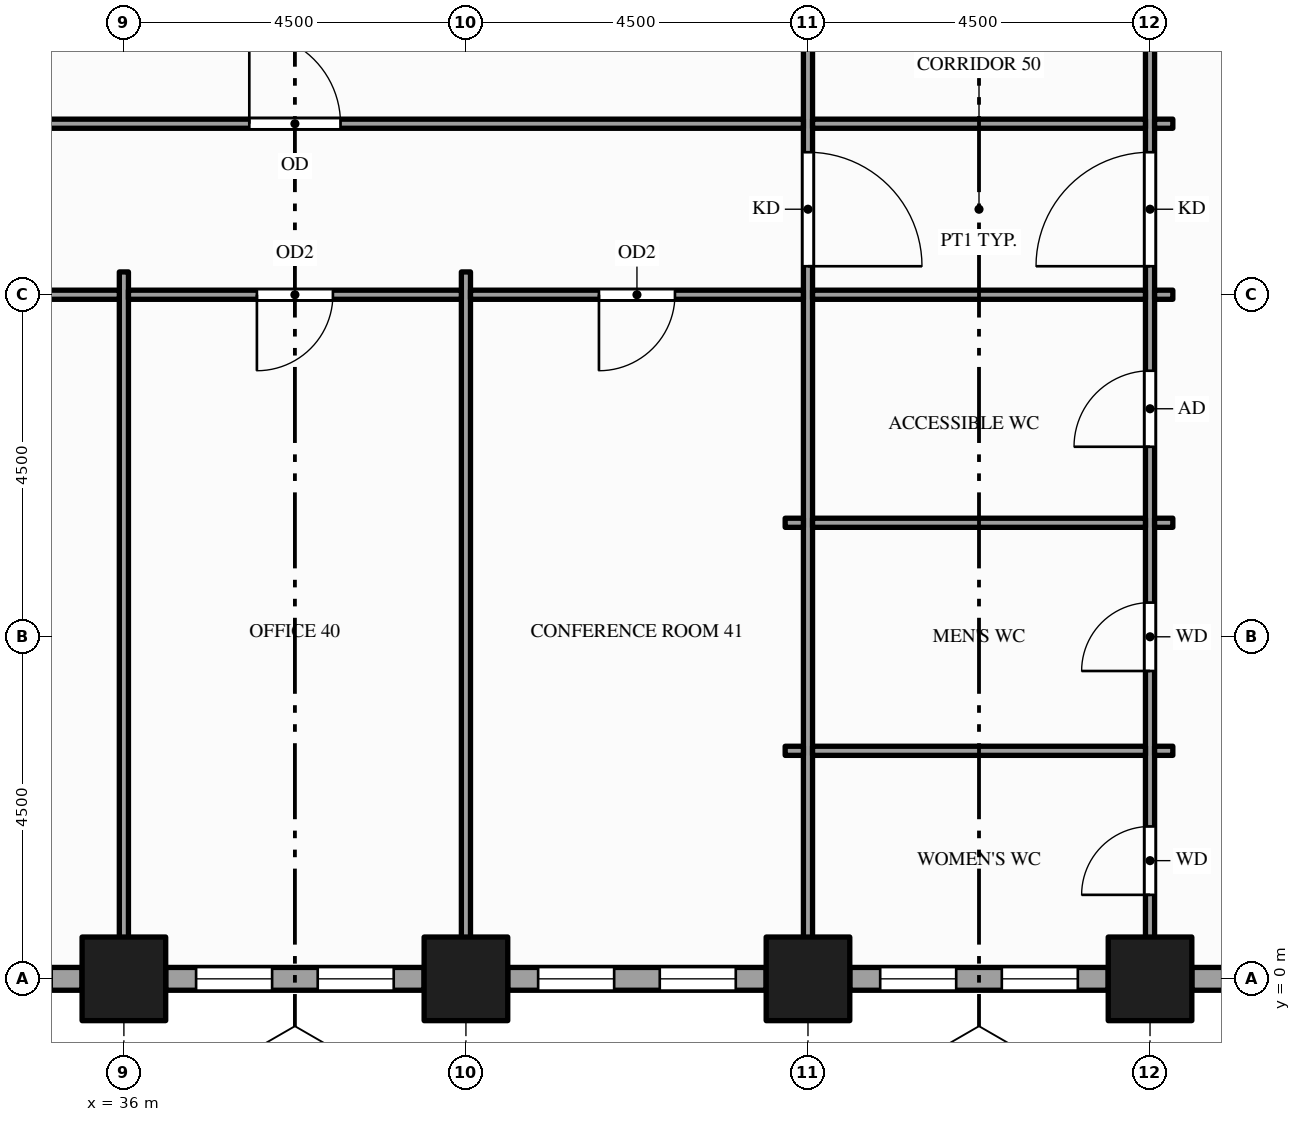
"""IFC4 building model, lengths in metres.
Left out: names, types, materials, properties, quantities, classifications, styles, units other than length and angle.
Written with IfcOpenShell. Run it as: python <this file> out.ifc"""

import sys

from ifc_helpers import new_model, si_unit, direction, frame, frame_2d, origin, origin_2d, place, context, subcontext, project, spatial, rectangle, hollow_rectangle, extrude, element, fill, save


model = new_model("IFC4")
c1 = context("Model", 3, precision=1e-05, world=origin(), true_north=direction((0.0, 1.0)))
c2 = subcontext(c1, "Body", "Model", "MODEL_VIEW")
j1 = project(units=[si_unit("LENGTHUNIT", "METRE"), si_unit("PLANEANGLEUNIT", "RADIAN")], contexts=[c1])
p1 = place(None, origin())
s1 = spatial("IfcSite", under=j1, at=p1, CompositionType="ELEMENT")
p2 = place(p1, origin())
s2 = spatial("IfcBuilding", under=s1, at=p2, CompositionType="ELEMENT")
p3 = place(p2, frame((0.0, 0.0, 8.0)))
s3 = spatial("IfcBuildingStorey", under=s2, at=p3, CompositionType="ELEMENT", Elevation=8.0)
for number, where, z_axis, x_axis in (
    (1, (36.0, 0.0, -0.25), (0.0, 0.0, 1.0), (1.0, 0.0, 0.0)),
    (2, (40.5, 0.0, -0.25), (0.0, 0.0, 1.0), (1.0, 0.0, 0.0)),
    (3, (45.0, 0.0, -0.25), (0.0, 0.0, 1.0), (1.0, 0.0, 0.0)),
    (4, (49.5, 0.0, -0.25), (0.0, 0.0, 1.0), (1.0, 0.0, 0.0)),
):
    element("IfcColumn", number, at=place(p3, frame(where, z_axis=z_axis, x_axis=x_axis)), inside=s3, PredefinedType="COLUMN", context=c2, shape_type="SweptSolid", body=[
        extrude(hollow_rectangle(XDim=1.1, YDim=1.1, WallThickness=0.06, at=origin_2d()), origin(), (0.0, 0.0, 1.0), 6.0),
    ])
p4 = place(p3, frame((32.05, 0.0, 0.0), z_axis=(0.0, 0.0, 1.0), x_axis=(1.0, 0.0, 0.0)))
e5 = element("IfcWall", 5, at=p4, inside=s3, PredefinedType="STANDARD", context=c2, shape_type="SweptSolid", body=[
    extrude(rectangle(XDim=3.4, YDim=0.3, at=frame_2d((1.7, 0.0))), origin(), (0.0, 0.0, 1.0), 5.036),
])
p5 = place(p4, frame((0.4, 0.0, 0.9)))
e6 = element("IfcOpeningElement", 6, at=p5, cuts=e5, PredefinedType="OPENING", context=c2, shape_type="SweptSolid", body=[
    extrude(rectangle(XDim=1.0, YDim=3.5, at=frame_2d((0.5, 1.75))), frame((0.0, 0.16, 0.0), z_axis=(0.0, -1.0, 0.0), x_axis=(1.0, 0.0, 0.0)), (0.0, 0.0, 1.0), 0.32),
])
p6 = place(p4, frame((2.0, 0.0, 0.9)))
e7 = element("IfcOpeningElement", 7, at=p6, cuts=e5, PredefinedType="OPENING", context=c2, shape_type="SweptSolid", body=[
    extrude(rectangle(XDim=1.0, YDim=3.5, at=frame_2d((0.5, 1.75))), frame((0.0, 0.16, 0.0), z_axis=(0.0, -1.0, 0.0), x_axis=(1.0, 0.0, 0.0)), (0.0, 0.0, 1.0), 0.32),
])
p7 = place(p3, frame((36.55, 0.0, 0.0), z_axis=(0.0, 0.0, 1.0), x_axis=(1.0, 0.0, 0.0)))
e8 = element("IfcWall", 8, at=p7, inside=s3, PredefinedType="STANDARD", context=c2, shape_type="SweptSolid", body=[
    extrude(rectangle(XDim=3.4, YDim=0.3, at=frame_2d((1.7, 0.0))), origin(), (0.0, 0.0, 1.0), 5.036),
])
p8 = place(p7, frame((0.4, 0.0, 0.9)))
e9 = element("IfcOpeningElement", 9, at=p8, cuts=e8, PredefinedType="OPENING", context=c2, shape_type="SweptSolid", body=[
    extrude(rectangle(XDim=1.0, YDim=3.5, at=frame_2d((0.5, 1.75))), frame((0.0, 0.16, 0.0), z_axis=(0.0, -1.0, 0.0), x_axis=(1.0, 0.0, 0.0)), (0.0, 0.0, 1.0), 0.32),
])
p9 = place(p7, frame((2.0, 0.0, 0.9)))
e10 = element("IfcOpeningElement", 10, at=p9, cuts=e8, PredefinedType="OPENING", context=c2, shape_type="SweptSolid", body=[
    extrude(rectangle(XDim=1.0, YDim=3.5, at=frame_2d((0.5, 1.75))), frame((0.0, 0.16, 0.0), z_axis=(0.0, -1.0, 0.0), x_axis=(1.0, 0.0, 0.0)), (0.0, 0.0, 1.0), 0.32),
])
p10 = place(p3, frame((41.05, 0.0, 0.0), z_axis=(0.0, 0.0, 1.0), x_axis=(1.0, 0.0, 0.0)))
e11 = element("IfcWall", 11, at=p10, inside=s3, PredefinedType="STANDARD", context=c2, shape_type="SweptSolid", body=[
    extrude(rectangle(XDim=3.4, YDim=0.3, at=frame_2d((1.7, 0.0))), origin(), (0.0, 0.0, 1.0), 5.036),
])
p11 = place(p10, frame((0.4, 0.0, 0.9)))
e12 = element("IfcOpeningElement", 12, at=p11, cuts=e11, PredefinedType="OPENING", context=c2, shape_type="SweptSolid", body=[
    extrude(rectangle(XDim=1.0, YDim=3.5, at=frame_2d((0.5, 1.75))), frame((0.0, 0.16, 0.0), z_axis=(0.0, -1.0, 0.0), x_axis=(1.0, 0.0, 0.0)), (0.0, 0.0, 1.0), 0.32),
])
p12 = place(p10, frame((2.0, 0.0, 0.9)))
e13 = element("IfcOpeningElement", 13, at=p12, cuts=e11, PredefinedType="OPENING", context=c2, shape_type="SweptSolid", body=[
    extrude(rectangle(XDim=1.0, YDim=3.5, at=frame_2d((0.5, 1.75))), frame((0.0, 0.16, 0.0), z_axis=(0.0, -1.0, 0.0), x_axis=(1.0, 0.0, 0.0)), (0.0, 0.0, 1.0), 0.32),
])
p13 = place(p3, frame((45.55, 0.0, 0.0), z_axis=(0.0, 0.0, 1.0), x_axis=(1.0, 0.0, 0.0)))
e14 = element("IfcWall", 14, at=p13, inside=s3, PredefinedType="STANDARD", context=c2, shape_type="SweptSolid", body=[
    extrude(rectangle(XDim=3.4, YDim=0.3, at=frame_2d((1.7, 0.0))), origin(), (0.0, 0.0, 1.0), 5.036),
])
p14 = place(p13, frame((0.4, 0.0, 0.9)))
e15 = element("IfcOpeningElement", 15, at=p14, cuts=e14, PredefinedType="OPENING", context=c2, shape_type="SweptSolid", body=[
    extrude(rectangle(XDim=1.0, YDim=3.5, at=frame_2d((0.5, 1.75))), frame((0.0, 0.16, 0.0), z_axis=(0.0, -1.0, 0.0), x_axis=(1.0, 0.0, 0.0)), (0.0, 0.0, 1.0), 0.32),
])
p15 = place(p13, frame((2.0, 0.0, 0.9)))
e16 = element("IfcOpeningElement", 16, at=p15, cuts=e14, PredefinedType="OPENING", context=c2, shape_type="SweptSolid", body=[
    extrude(rectangle(XDim=1.0, YDim=3.5, at=frame_2d((0.5, 1.75))), frame((0.0, 0.16, 0.0), z_axis=(0.0, -1.0, 0.0), x_axis=(1.0, 0.0, 0.0)), (0.0, 0.0, 1.0), 0.32),
])
p16 = place(p3, frame((50.05, 0.0, 0.0), z_axis=(0.0, 0.0, 1.0), x_axis=(1.0, 0.0, 0.0)))
e17 = element("IfcWall", 17, at=p16, inside=s3, PredefinedType="STANDARD", context=c2, shape_type="SweptSolid", body=[
    extrude(rectangle(XDim=3.949, YDim=0.3, at=frame_2d((1.975, 0.0))), origin(), (0.0, 0.0, 1.0), 5.036),
])
p17 = place(p16, frame((0.4, 0.0, 0.9)))
e18 = element("IfcOpeningElement", 18, at=p17, cuts=e17, PredefinedType="OPENING", context=c2, shape_type="SweptSolid", body=[
    extrude(rectangle(XDim=1.0, YDim=3.5, at=frame_2d((0.5, 1.75))), frame((0.0, 0.16, 0.0), z_axis=(0.0, -1.0, 0.0), x_axis=(1.0, 0.0, 0.0)), (0.0, 0.0, 1.0), 0.32),
])
p18 = place(p16, frame((2.024, 0.0, 0.9)))
e19 = element("IfcOpeningElement", 19, at=p18, cuts=e17, PredefinedType="OPENING", context=c2, shape_type="SweptSolid", body=[
    extrude(rectangle(XDim=1.5, YDim=3.5, at=frame_2d((0.75, 1.75))), frame((0.0, 0.16, 0.0), z_axis=(0.0, -1.0, 0.0), x_axis=(1.0, 0.0, 0.0)), (0.0, 0.0, 1.0), 0.32),
])
for number, where, z_axis, x_axis in (
    (20, (36.0, 0.15, 0.0), (0.0, 0.0, 1.0), (0.0, 1.0, 0.0)),
    (21, (40.5, 0.15, 0.0), (0.0, 0.0, 1.0), (0.0, 1.0, 0.0)),
):
    element("IfcWall", number, at=place(p3, frame(where, z_axis=z_axis, x_axis=x_axis)), inside=s3, PredefinedType="PARTITIONING", context=c2, shape_type="SweptSolid", body=[
        extrude(rectangle(XDim=9.15, YDim=0.12, at=frame_2d((4.575, 0.0))), origin(), (0.0, 0.0, 1.0), 4.759),
    ])
p19 = place(p3, frame((45.0, 0.15, 0.0), z_axis=(0.0, 0.0, 1.0), x_axis=(0.0, 1.0, 0.0)))
e22 = element("IfcWall", 22, at=p19, inside=s3, PredefinedType="PARTITIONING", context=c2, shape_type="SweptSolid", body=[
    extrude(rectangle(XDim=22.65, YDim=0.12, at=frame_2d((11.325, 0.0))), origin(), (0.0, 0.0, 1.0), 4.759),
])
p20 = place(p19, frame((9.225, 0.0, 0.0)))
e23 = element("IfcOpeningElement", 23, at=p20, cuts=e22, PredefinedType="OPENING", context=c2, shape_type="SweptSolid", body=[
    extrude(rectangle(XDim=1.5, YDim=2.1, at=frame_2d((0.75, 1.05))), frame((0.0, 0.07, 0.0), z_axis=(0.0, -1.0, 0.0), x_axis=(1.0, 0.0, 0.0)), (0.0, 0.0, 1.0), 0.14),
])
p21 = place(p3, frame((49.5, 0.15, 0.0), z_axis=(0.0, 0.0, 1.0), x_axis=(0.0, 1.0, 0.0)))
e24 = element("IfcWall", 24, at=p21, inside=s3, PredefinedType="PARTITIONING", context=c2, shape_type="SweptSolid", body=[
    extrude(rectangle(XDim=22.65, YDim=0.12, at=frame_2d((11.325, 0.0))), origin(), (0.0, 0.0, 1.0), 4.759),
])
p22 = place(p21, frame((0.955, 0.0, 0.0)))
e25 = element("IfcOpeningElement", 25, at=p22, cuts=e24, PredefinedType="OPENING", context=c2, shape_type="SweptSolid", body=[
    extrude(rectangle(XDim=0.9, YDim=2.1, at=frame_2d((0.45, 1.05))), frame((0.0, 0.07, 0.0), z_axis=(0.0, -1.0, 0.0), x_axis=(1.0, 0.0, 0.0)), (0.0, 0.0, 1.0), 0.14),
])
p23 = place(p21, frame((3.9, 0.0, 0.0)))
e26 = element("IfcOpeningElement", 26, at=p23, cuts=e24, PredefinedType="OPENING", context=c2, shape_type="SweptSolid", body=[
    extrude(rectangle(XDim=0.9, YDim=2.1, at=frame_2d((0.45, 1.05))), frame((0.0, 0.07, 0.0), z_axis=(0.0, -1.0, 0.0), x_axis=(1.0, 0.0, 0.0)), (0.0, 0.0, 1.0), 0.14),
])
p24 = place(p21, frame((6.85, 0.0, 0.0)))
e27 = element("IfcOpeningElement", 27, at=p24, cuts=e24, PredefinedType="OPENING", context=c2, shape_type="SweptSolid", body=[
    extrude(rectangle(XDim=1.0, YDim=2.1, at=frame_2d((0.5, 1.05))), frame((0.0, 0.07, 0.0), z_axis=(0.0, -1.0, 0.0), x_axis=(1.0, 0.0, 0.0)), (0.0, 0.0, 1.0), 0.14),
])
p25 = place(p21, frame((16.275, 0.0, 0.0)))
e28 = element("IfcOpeningElement", 28, at=p25, cuts=e24, PredefinedType="OPENING", context=c2, shape_type="SweptSolid", body=[
    extrude(rectangle(XDim=0.9, YDim=2.1, at=frame_2d((0.45, 1.05))), frame((0.0, 0.07, 0.0), z_axis=(0.0, -1.0, 0.0), x_axis=(1.0, 0.0, 0.0)), (0.0, 0.0, 1.0), 0.14),
])
p26 = place(p21, frame((9.225, 0.0, 0.0)))
e29 = element("IfcOpeningElement", 29, at=p26, cuts=e24, PredefinedType="OPENING", context=c2, shape_type="SweptSolid", body=[
    extrude(rectangle(XDim=1.5, YDim=2.1, at=frame_2d((0.75, 1.05))), frame((0.0, 0.07, 0.0), z_axis=(0.0, -1.0, 0.0), x_axis=(1.0, 0.0, 0.0)), (0.0, 0.0, 1.0), 0.14),
])
p27 = place(p3, frame((44.7, 3.0, 0.0), z_axis=(0.0, 0.0, 1.0), x_axis=(1.0, 0.0, 0.0)))
e30 = element("IfcWall", 30, at=p27, inside=s3, PredefinedType="PARTITIONING", context=c2, shape_type="SweptSolid", body=[
    extrude(rectangle(XDim=0.24, YDim=0.12, at=frame_2d((0.12, 0.0))), origin(), (0.0, 0.0, 1.0), 4.759),
])
p28 = place(p3, frame((45.06, 3.0, 0.0), z_axis=(0.0, 0.0, 1.0), x_axis=(1.0, 0.0, 0.0)))
e31 = element("IfcWall", 31, at=p28, inside=s3, PredefinedType="PARTITIONING", context=c2, shape_type="SweptSolid", body=[
    extrude(rectangle(XDim=4.38, YDim=0.12, at=frame_2d((2.19, 0.0))), origin(), (0.0, 0.0, 1.0), 4.66),
])
for number, where, z_axis, x_axis in (
    (32, (49.56, 3.0, 0.0), (0.0, 0.0, 1.0), (1.0, 0.0, 0.0)),
    (33, (44.7, 6.0, 0.0), (0.0, 0.0, 1.0), (1.0, 0.0, 0.0)),
):
    element("IfcWall", number, at=place(p3, frame(where, z_axis=z_axis, x_axis=x_axis)), inside=s3, PredefinedType="PARTITIONING", context=c2, shape_type="SweptSolid", body=[
        extrude(rectangle(XDim=0.24, YDim=0.12, at=frame_2d((0.12, 0.0))), origin(), (0.0, 0.0, 1.0), 4.759),
    ])
p29 = place(p3, frame((45.06, 6.0, 0.0), z_axis=(0.0, 0.0, 1.0), x_axis=(1.0, 0.0, 0.0)))
e34 = element("IfcWall", 34, at=p29, inside=s3, PredefinedType="PARTITIONING", context=c2, shape_type="SweptSolid", body=[
    extrude(rectangle(XDim=4.38, YDim=0.12, at=frame_2d((2.19, 0.0))), origin(), (0.0, 0.0, 1.0), 4.66),
])
p30 = place(p3, frame((49.56, 6.0, 0.0), z_axis=(0.0, 0.0, 1.0), x_axis=(1.0, 0.0, 0.0)))
e35 = element("IfcWall", 35, at=p30, inside=s3, PredefinedType="PARTITIONING", context=c2, shape_type="SweptSolid", body=[
    extrude(rectangle(XDim=0.24, YDim=0.12, at=frame_2d((0.12, 0.0))), origin(), (0.0, 0.0, 1.0), 4.759),
])
p31 = place(p3, frame((31.56, 9.0, 0.0), z_axis=(0.0, 0.0, 1.0), x_axis=(1.0, 0.0, 0.0)))
e36 = element("IfcWall", 36, at=p31, inside=s3, PredefinedType="PARTITIONING", context=c2, shape_type="SweptSolid", body=[
    extrude(rectangle(XDim=4.38, YDim=0.12, at=frame_2d((2.19, 0.0))), origin(), (0.0, 0.0, 1.0), 4.66),
])
p32 = place(p31, frame((1.69, 0.0, 0.0)))
e37 = element("IfcOpeningElement", 37, at=p32, cuts=e36, PredefinedType="OPENING", context=c2, shape_type="SweptSolid", body=[
    extrude(rectangle(XDim=1.0, YDim=2.1, at=frame_2d((0.5, 1.05))), frame((0.0, 0.07, 0.0), z_axis=(0.0, -1.0, 0.0), x_axis=(1.0, 0.0, 0.0)), (0.0, 0.0, 1.0), 0.14),
])
p33 = place(p3, frame((36.06, 9.0, 0.0), z_axis=(0.0, 0.0, 1.0), x_axis=(1.0, 0.0, 0.0)))
e38 = element("IfcWall", 38, at=p33, inside=s3, PredefinedType="PARTITIONING", context=c2, shape_type="SweptSolid", body=[
    extrude(rectangle(XDim=4.38, YDim=0.12, at=frame_2d((2.19, 0.0))), origin(), (0.0, 0.0, 1.0), 4.66),
])
p34 = place(p33, frame((1.69, 0.0, 0.0)))
e39 = element("IfcOpeningElement", 39, at=p34, cuts=e38, PredefinedType="OPENING", context=c2, shape_type="SweptSolid", body=[
    extrude(rectangle(XDim=1.0, YDim=2.1, at=frame_2d((0.5, 1.05))), frame((0.0, 0.07, 0.0), z_axis=(0.0, -1.0, 0.0), x_axis=(1.0, 0.0, 0.0)), (0.0, 0.0, 1.0), 0.14),
])
p35 = place(p3, frame((40.56, 9.0, 0.0), z_axis=(0.0, 0.0, 1.0), x_axis=(1.0, 0.0, 0.0)))
e40 = element("IfcWall", 40, at=p35, inside=s3, PredefinedType="PARTITIONING", context=c2, shape_type="SweptSolid", body=[
    extrude(rectangle(XDim=4.38, YDim=0.12, at=frame_2d((2.19, 0.0))), origin(), (0.0, 0.0, 1.0), 4.66),
])
p36 = place(p35, frame((1.69, 0.0, 0.0)))
e41 = element("IfcOpeningElement", 41, at=p36, cuts=e40, PredefinedType="OPENING", context=c2, shape_type="SweptSolid", body=[
    extrude(rectangle(XDim=1.0, YDim=2.1, at=frame_2d((0.5, 1.05))), frame((0.0, 0.07, 0.0), z_axis=(0.0, -1.0, 0.0), x_axis=(1.0, 0.0, 0.0)), (0.0, 0.0, 1.0), 0.14),
])
p37 = place(p3, frame((45.06, 9.0, 0.0), z_axis=(0.0, 0.0, 1.0), x_axis=(1.0, 0.0, 0.0)))
e42 = element("IfcWall", 42, at=p37, inside=s3, PredefinedType="PARTITIONING", context=c2, shape_type="SweptSolid", body=[
    extrude(rectangle(XDim=4.38, YDim=0.12, at=frame_2d((2.19, 0.0))), origin(), (0.0, 0.0, 1.0), 4.66),
])
p38 = place(p3, frame((49.56, 9.0, 0.0), z_axis=(0.0, 0.0, 1.0), x_axis=(1.0, 0.0, 0.0)))
e43 = element("IfcWall", 43, at=p38, inside=s3, PredefinedType="PARTITIONING", context=c2, shape_type="SweptSolid", body=[
    extrude(rectangle(XDim=0.24, YDim=0.12, at=frame_2d((0.12, 0.0))), origin(), (0.0, 0.0, 1.0), 4.759),
])
p39 = place(p3, frame((31.56, 11.25, 0.0), z_axis=(0.0, 0.0, 1.0), x_axis=(1.0, 0.0, 0.0)))
e44 = element("IfcWall", 44, at=p39, inside=s3, PredefinedType="PARTITIONING", context=c2, shape_type="SweptSolid", body=[
    extrude(rectangle(XDim=13.38, YDim=0.12, at=frame_2d((6.69, 0.0))), origin(), (0.0, 0.0, 1.0), 4.66),
])
p40 = place(p39, frame((6.09, 0.0, 0.0)))
e45 = element("IfcOpeningElement", 45, at=p40, cuts=e44, PredefinedType="OPENING", context=c2, shape_type="SweptSolid", body=[
    extrude(rectangle(XDim=1.2, YDim=2.1, at=frame_2d((0.6, 1.05))), frame((0.0, 0.07, 0.0), z_axis=(0.0, -1.0, 0.0), x_axis=(1.0, 0.0, 0.0)), (0.0, 0.0, 1.0), 0.14),
])
p41 = place(p3, frame((45.06, 11.25, 0.0), z_axis=(0.0, 0.0, 1.0), x_axis=(1.0, 0.0, 0.0)))
e46 = element("IfcWall", 46, at=p41, inside=s3, PredefinedType="PARTITIONING", context=c2, shape_type="SweptSolid", body=[
    extrude(rectangle(XDim=4.38, YDim=0.12, at=frame_2d((2.19, 0.0))), origin(), (0.0, 0.0, 1.0), 4.66),
])
p42 = place(p3, frame((49.56, 11.25, 0.0), z_axis=(0.0, 0.0, 1.0), x_axis=(1.0, 0.0, 0.0)))
e47 = element("IfcWall", 47, at=p42, inside=s3, PredefinedType="PARTITIONING", context=c2, shape_type="SweptSolid", body=[
    extrude(rectangle(XDim=0.24, YDim=0.12, at=frame_2d((0.12, 0.0))), origin(), (0.0, 0.0, 1.0), 4.759),
])
p43 = place(p8, origin())
e48 = element("IfcWindow", 48, at=p43, inside=s3, PartitioningType="SINGLE_PANEL", PredefinedType="WINDOW", context=c2, shape_type="SweptSolid", body=[
    extrude(rectangle(XDim=1.0, YDim=3.5, at=frame_2d((0.5, 1.75))), frame((0.0, 0.03, 0.0), z_axis=(0.0, -1.0, 0.0), x_axis=(1.0, 0.0, 0.0)), (0.0, 0.0, 1.0), 0.06),
])
fill(e9, e48)
p44 = place(p9, origin())
e49 = element("IfcWindow", 49, at=p44, inside=s3, PartitioningType="SINGLE_PANEL", PredefinedType="WINDOW", context=c2, shape_type="SweptSolid", body=[
    extrude(rectangle(XDim=1.0, YDim=3.5, at=frame_2d((0.5, 1.75))), frame((0.0, 0.03, 0.0), z_axis=(0.0, -1.0, 0.0), x_axis=(1.0, 0.0, 0.0)), (0.0, 0.0, 1.0), 0.06),
])
fill(e10, e49)
p45 = place(p11, origin())
e50 = element("IfcWindow", 50, at=p45, inside=s3, PartitioningType="SINGLE_PANEL", PredefinedType="WINDOW", context=c2, shape_type="SweptSolid", body=[
    extrude(rectangle(XDim=1.0, YDim=3.5, at=frame_2d((0.5, 1.75))), frame((0.0, 0.03, 0.0), z_axis=(0.0, -1.0, 0.0), x_axis=(1.0, 0.0, 0.0)), (0.0, 0.0, 1.0), 0.06),
])
fill(e12, e50)
p46 = place(p12, origin())
e51 = element("IfcWindow", 51, at=p46, inside=s3, PartitioningType="SINGLE_PANEL", PredefinedType="WINDOW", context=c2, shape_type="SweptSolid", body=[
    extrude(rectangle(XDim=1.0, YDim=3.5, at=frame_2d((0.5, 1.75))), frame((0.0, 0.03, 0.0), z_axis=(0.0, -1.0, 0.0), x_axis=(1.0, 0.0, 0.0)), (0.0, 0.0, 1.0), 0.06),
])
fill(e13, e51)
p47 = place(p14, origin())
e52 = element("IfcWindow", 52, at=p47, inside=s3, PartitioningType="SINGLE_PANEL", PredefinedType="WINDOW", context=c2, shape_type="SweptSolid", body=[
    extrude(rectangle(XDim=1.0, YDim=3.5, at=frame_2d((0.5, 1.75))), frame((0.0, 0.03, 0.0), z_axis=(0.0, -1.0, 0.0), x_axis=(1.0, 0.0, 0.0)), (0.0, 0.0, 1.0), 0.06),
])
fill(e15, e52)
p48 = place(p15, origin())
e53 = element("IfcWindow", 53, at=p48, inside=s3, PartitioningType="SINGLE_PANEL", PredefinedType="WINDOW", context=c2, shape_type="SweptSolid", body=[
    extrude(rectangle(XDim=1.0, YDim=3.5, at=frame_2d((0.5, 1.75))), frame((0.0, 0.03, 0.0), z_axis=(0.0, -1.0, 0.0), x_axis=(1.0, 0.0, 0.0)), (0.0, 0.0, 1.0), 0.06),
])
fill(e16, e53)
p49 = place(p22, origin())
e54 = element("IfcDoor", 54, at=p49, inside=s3, OperationType="SINGLE_SWING_LEFT", PredefinedType="DOOR", context=c2, shape_type="SweptSolid", body=[
    extrude(rectangle(XDim=0.9, YDim=2.1, at=frame_2d((0.45, 1.05))), frame((0.0, 0.025, 0.0), z_axis=(0.0, -1.0, 0.0), x_axis=(1.0, 0.0, 0.0)), (0.0, 0.0, 1.0), 0.05),
])
fill(e25, e54)
p50 = place(p23, origin())
e55 = element("IfcDoor", 55, at=p50, inside=s3, OperationType="SINGLE_SWING_LEFT", PredefinedType="DOOR", context=c2, shape_type="SweptSolid", body=[
    extrude(rectangle(XDim=0.9, YDim=2.1, at=frame_2d((0.45, 1.05))), frame((0.0, 0.025, 0.0), z_axis=(0.0, -1.0, 0.0), x_axis=(1.0, 0.0, 0.0)), (0.0, 0.0, 1.0), 0.05),
])
fill(e26, e55)
p51 = place(p24, origin())
e56 = element("IfcDoor", 56, at=p51, inside=s3, OperationType="SINGLE_SWING_LEFT", PredefinedType="DOOR", context=c2, shape_type="SweptSolid", body=[
    extrude(rectangle(XDim=1.0, YDim=2.1, at=frame_2d((0.5, 1.05))), frame((0.0, 0.025, 0.0), z_axis=(0.0, -1.0, 0.0), x_axis=(1.0, 0.0, 0.0)), (0.0, 0.0, 1.0), 0.05),
])
fill(e27, e56)
p52 = place(p26, origin())
e57 = element("IfcDoor", 57, at=p52, inside=s3, OperationType="SINGLE_SWING_LEFT", PredefinedType="DOOR", context=c2, shape_type="SweptSolid", body=[
    extrude(rectangle(XDim=1.5, YDim=2.1, at=frame_2d((0.75, 1.05))), frame((0.0, 0.025, 0.0), z_axis=(0.0, -1.0, 0.0), x_axis=(1.0, 0.0, 0.0)), (0.0, 0.0, 1.0), 0.05),
])
fill(e29, e57)
p53 = place(p20, origin())
e58 = element("IfcDoor", 58, at=p53, inside=s3, OperationType="SINGLE_SWING_LEFT", PredefinedType="DOOR", context=c2, shape_type="SweptSolid", body=[
    extrude(rectangle(XDim=1.5, YDim=2.1, at=frame_2d((0.75, 1.05))), frame((0.0, 0.025, 0.0), z_axis=(0.0, -1.0, 0.0), x_axis=(1.0, 0.0, 0.0)), (0.0, 0.0, 1.0), 0.05),
])
fill(e23, e58)
p54 = place(p34, origin())
e59 = element("IfcDoor", 59, at=p54, inside=s3, OperationType="SINGLE_SWING_LEFT", PredefinedType="DOOR", context=c2, shape_type="SweptSolid", body=[
    extrude(rectangle(XDim=1.0, YDim=2.1, at=frame_2d((0.5, 1.05))), frame((0.0, 0.025, 0.0), z_axis=(0.0, -1.0, 0.0), x_axis=(1.0, 0.0, 0.0)), (0.0, 0.0, 1.0), 0.05),
])
fill(e39, e59)
p55 = place(p36, origin())
e60 = element("IfcDoor", 60, at=p55, inside=s3, OperationType="SINGLE_SWING_LEFT", PredefinedType="DOOR", context=c2, shape_type="SweptSolid", body=[
    extrude(rectangle(XDim=1.0, YDim=2.1, at=frame_2d((0.5, 1.05))), frame((0.0, 0.025, 0.0), z_axis=(0.0, -1.0, 0.0), x_axis=(1.0, 0.0, 0.0)), (0.0, 0.0, 1.0), 0.05),
])
fill(e41, e60)
p56 = place(p40, origin())
e61 = element("IfcDoor", 61, at=p56, inside=s3, OperationType="SINGLE_SWING_LEFT", PredefinedType="DOOR", context=c2, shape_type="SweptSolid", body=[
    extrude(rectangle(XDim=1.2, YDim=2.1, at=frame_2d((0.6, 1.05))), frame((0.0, 0.025, 0.0), z_axis=(0.0, -1.0, 0.0), x_axis=(1.0, 0.0, 0.0)), (0.0, 0.0, 1.0), 0.05),
])
fill(e45, e61)
save(model, sys.argv[1])
